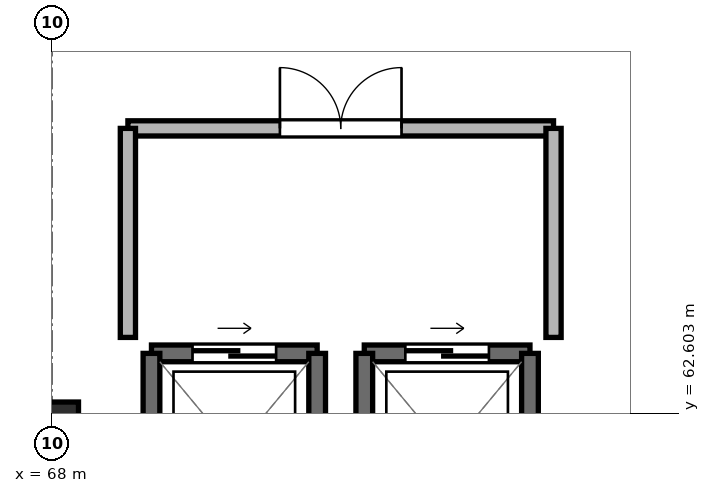
"""IFC4 building model, lengths in metres.
Left out: names, types, materials, properties, quantities, classifications, styles, units other than length and angle.
Written with IfcOpenShell. Run it as: python <this file> out.ifc"""

import sys

from ifc_helpers import new_model, si_unit, direction, frame, frame_2d, origin, origin_2d, place, context, subcontext, project, spatial, rectangle, extrude, element, fill, save


model = new_model("IFC4")
c1 = context("Model", 3, precision=1e-05, world=origin(), true_north=direction((0.0, 1.0)))
c2 = subcontext(c1, "Body", "Model", "MODEL_VIEW")
j1 = project(units=[si_unit("LENGTHUNIT", "METRE"), si_unit("PLANEANGLEUNIT", "RADIAN")], contexts=[c1])
p1 = place(None, origin())
s1 = spatial("IfcSite", under=j1, at=p1, CompositionType="ELEMENT")
p2 = place(p1, origin())
s2 = spatial("IfcBuilding", under=s1, at=p2, CompositionType="ELEMENT")
p3 = place(p2, frame((0.0, 0.0, 50.3)))
s3 = spatial("IfcBuildingStorey", under=s2, at=p3, CompositionType="ELEMENT", Elevation=50.3)
p4 = place(p3, frame((68.0, 62.4, -0.23), z_axis=(0.0, 0.0, 1.0), x_axis=(1.0, 0.0, 0.0)))
e1 = element("IfcColumn", 1, at=p4, inside=s3, PredefinedType="COLUMN", context=c2, shape_type="SweptSolid", body=[
    extrude(rectangle(XDim=0.7, YDim=0.7, at=origin_2d()), origin(), (0.0, 0.0, 1.0), 3.26),
])
p5 = place(p3, frame((71.49, 63.39, 0.0), z_axis=(0.0, 0.0, 1.0), x_axis=(-1.0, 0.0, 0.0)))
e2 = element("IfcWall", 2, at=p5, inside=s3, PredefinedType="SHEAR", context=c2, shape_type="SweptSolid", body=[
    extrude(rectangle(XDim=2.18, YDim=0.22, at=frame_2d((1.09, 0.0))), origin(), (0.0, 0.0, 1.0), 3.03),
])
p6 = place(p5, frame((0.54, 0.0, 0.0)))
e3 = element("IfcOpeningElement", 3, at=p6, cuts=e2, PredefinedType="OPENING", context=c2, shape_type="SweptSolid", body=[
    extrude(rectangle(XDim=1.1, YDim=2.2, at=frame_2d((0.55, 1.1))), frame((0.0, 0.122, 0.0), z_axis=(0.0, -1.0, 0.0), x_axis=(1.0, 0.0, 0.0)), (0.0, 0.0, 1.0), 0.244),
])
for number, where, z_axis, x_axis in (
    (4, (69.31, 63.39, 0.0), (0.0, 0.0, 1.0), (0.0, -1.0, 0.0)),
    (5, (71.49, 60.81, 0.0), (0.0, 0.0, 1.0), (0.0, 1.0, 0.0)),
):
    element("IfcWall", number, at=place(p3, frame(where, z_axis=z_axis, x_axis=x_axis)), inside=s3, PredefinedType="SHEAR", context=c2, shape_type="SweptSolid", body=[
        extrude(rectangle(XDim=2.58, YDim=0.22, at=frame_2d((1.29, 0.0))), origin(), (0.0, 0.0, 1.0), 3.03),
    ])
p7 = place(p3, frame((74.29, 63.39, 0.0), z_axis=(0.0, 0.0, 1.0), x_axis=(-1.0, 0.0, 0.0)))
e6 = element("IfcWall", 6, at=p7, inside=s3, PredefinedType="SHEAR", context=c2, shape_type="SweptSolid", body=[
    extrude(rectangle(XDim=2.18, YDim=0.22, at=frame_2d((1.09, 0.0))), origin(), (0.0, 0.0, 1.0), 3.03),
])
p8 = place(p7, frame((0.54, 0.0, 0.0)))
e7 = element("IfcOpeningElement", 7, at=p8, cuts=e6, PredefinedType="OPENING", context=c2, shape_type="SweptSolid", body=[
    extrude(rectangle(XDim=1.1, YDim=2.2, at=frame_2d((0.55, 1.1))), frame((0.0, 0.122, 0.0), z_axis=(0.0, -1.0, 0.0), x_axis=(1.0, 0.0, 0.0)), (0.0, 0.0, 1.0), 0.244),
])
for number, where, z_axis, x_axis in (
    (8, (72.11, 63.39, 0.0), (0.0, 0.0, 1.0), (0.0, -1.0, 0.0)),
    (9, (74.29, 60.81, 0.0), (0.0, 0.0, 1.0), (0.0, 1.0, 0.0)),
):
    element("IfcWall", number, at=place(p3, frame(where, z_axis=z_axis, x_axis=x_axis)), inside=s3, PredefinedType="SHEAR", context=c2, shape_type="SweptSolid", body=[
        extrude(rectangle(XDim=2.58, YDim=0.22, at=frame_2d((1.29, 0.0))), origin(), (0.0, 0.0, 1.0), 3.03),
    ])
p9 = place(p3, frame((69.0, 66.35, 0.0), z_axis=(0.0, 0.0, 1.0), x_axis=(1.0, 0.0, 0.0)))
e10 = element("IfcWall", 10, at=p9, inside=s3, PredefinedType="PARTITIONING", context=c2, shape_type="SweptSolid", body=[
    extrude(rectangle(XDim=5.6, YDim=0.2, at=frame_2d((2.8, 0.0))), origin(), (0.0, 0.0, 1.0), 2.53),
])
p10 = place(p9, frame((2.0, 0.0, 0.0)))
e11 = element("IfcOpeningElement", 11, at=p10, cuts=e10, PredefinedType="OPENING", context=c2, shape_type="SweptSolid", body=[
    extrude(rectangle(XDim=1.6, YDim=2.2, at=frame_2d((0.8, 1.1))), frame((0.0, 0.112, 0.0), z_axis=(0.0, -1.0, 0.0), x_axis=(1.0, 0.0, 0.0)), (0.0, 0.0, 1.0), 0.224),
])
for number, where, z_axis, x_axis in (
    (12, (69.0, 63.6, 0.0), (0.0, 0.0, 1.0), (0.0, 1.0, 0.0)),
    (13, (74.6, 63.6, 0.0), (0.0, 0.0, 1.0), (0.0, 1.0, 0.0)),
):
    element("IfcWall", number, at=place(p3, frame(where, z_axis=z_axis, x_axis=x_axis)), inside=s3, PredefinedType="PARTITIONING", context=c2, shape_type="SweptSolid", body=[
        extrude(rectangle(XDim=2.75, YDim=0.2, at=frame_2d((1.375, 0.0))), origin(), (0.0, 0.0, 1.0), 2.53),
    ])
p11 = place(p6, origin())
e14 = element("IfcDoor", 14, at=p11, inside=s3, OperationType="SLIDING_TO_LEFT", PredefinedType="DOOR", context=c2, shape_type="SweptSolid", body=[
    extrude(rectangle(XDim=1.1, YDim=2.2, at=frame_2d((0.55, 1.1))), frame((0.0, 0.025, 0.0), z_axis=(0.0, -1.0, 0.0), x_axis=(1.0, 0.0, 0.0)), (0.0, 0.0, 1.0), 0.05),
])
fill(e3, e14)
p12 = place(p8, origin())
e15 = element("IfcDoor", 15, at=p12, inside=s3, OperationType="SLIDING_TO_LEFT", PredefinedType="DOOR", context=c2, shape_type="SweptSolid", body=[
    extrude(rectangle(XDim=1.1, YDim=2.2, at=frame_2d((0.55, 1.1))), frame((0.0, 0.025, 0.0), z_axis=(0.0, -1.0, 0.0), x_axis=(1.0, 0.0, 0.0)), (0.0, 0.0, 1.0), 0.05),
])
fill(e7, e15)
p13 = place(p10, origin())
e16 = element("IfcDoor", 16, at=p13, inside=s3, OperationType="DOUBLE_DOOR_SINGLE_SWING", PredefinedType="DOOR", context=c2, shape_type="SweptSolid", body=[
    extrude(rectangle(XDim=1.6, YDim=2.2, at=frame_2d((0.8, 1.1))), frame((0.0, 0.025, 0.0), z_axis=(0.0, -1.0, 0.0), x_axis=(1.0, 0.0, 0.0)), (0.0, 0.0, 1.0), 0.05),
])
fill(e11, e16)
save(model, sys.argv[1])
